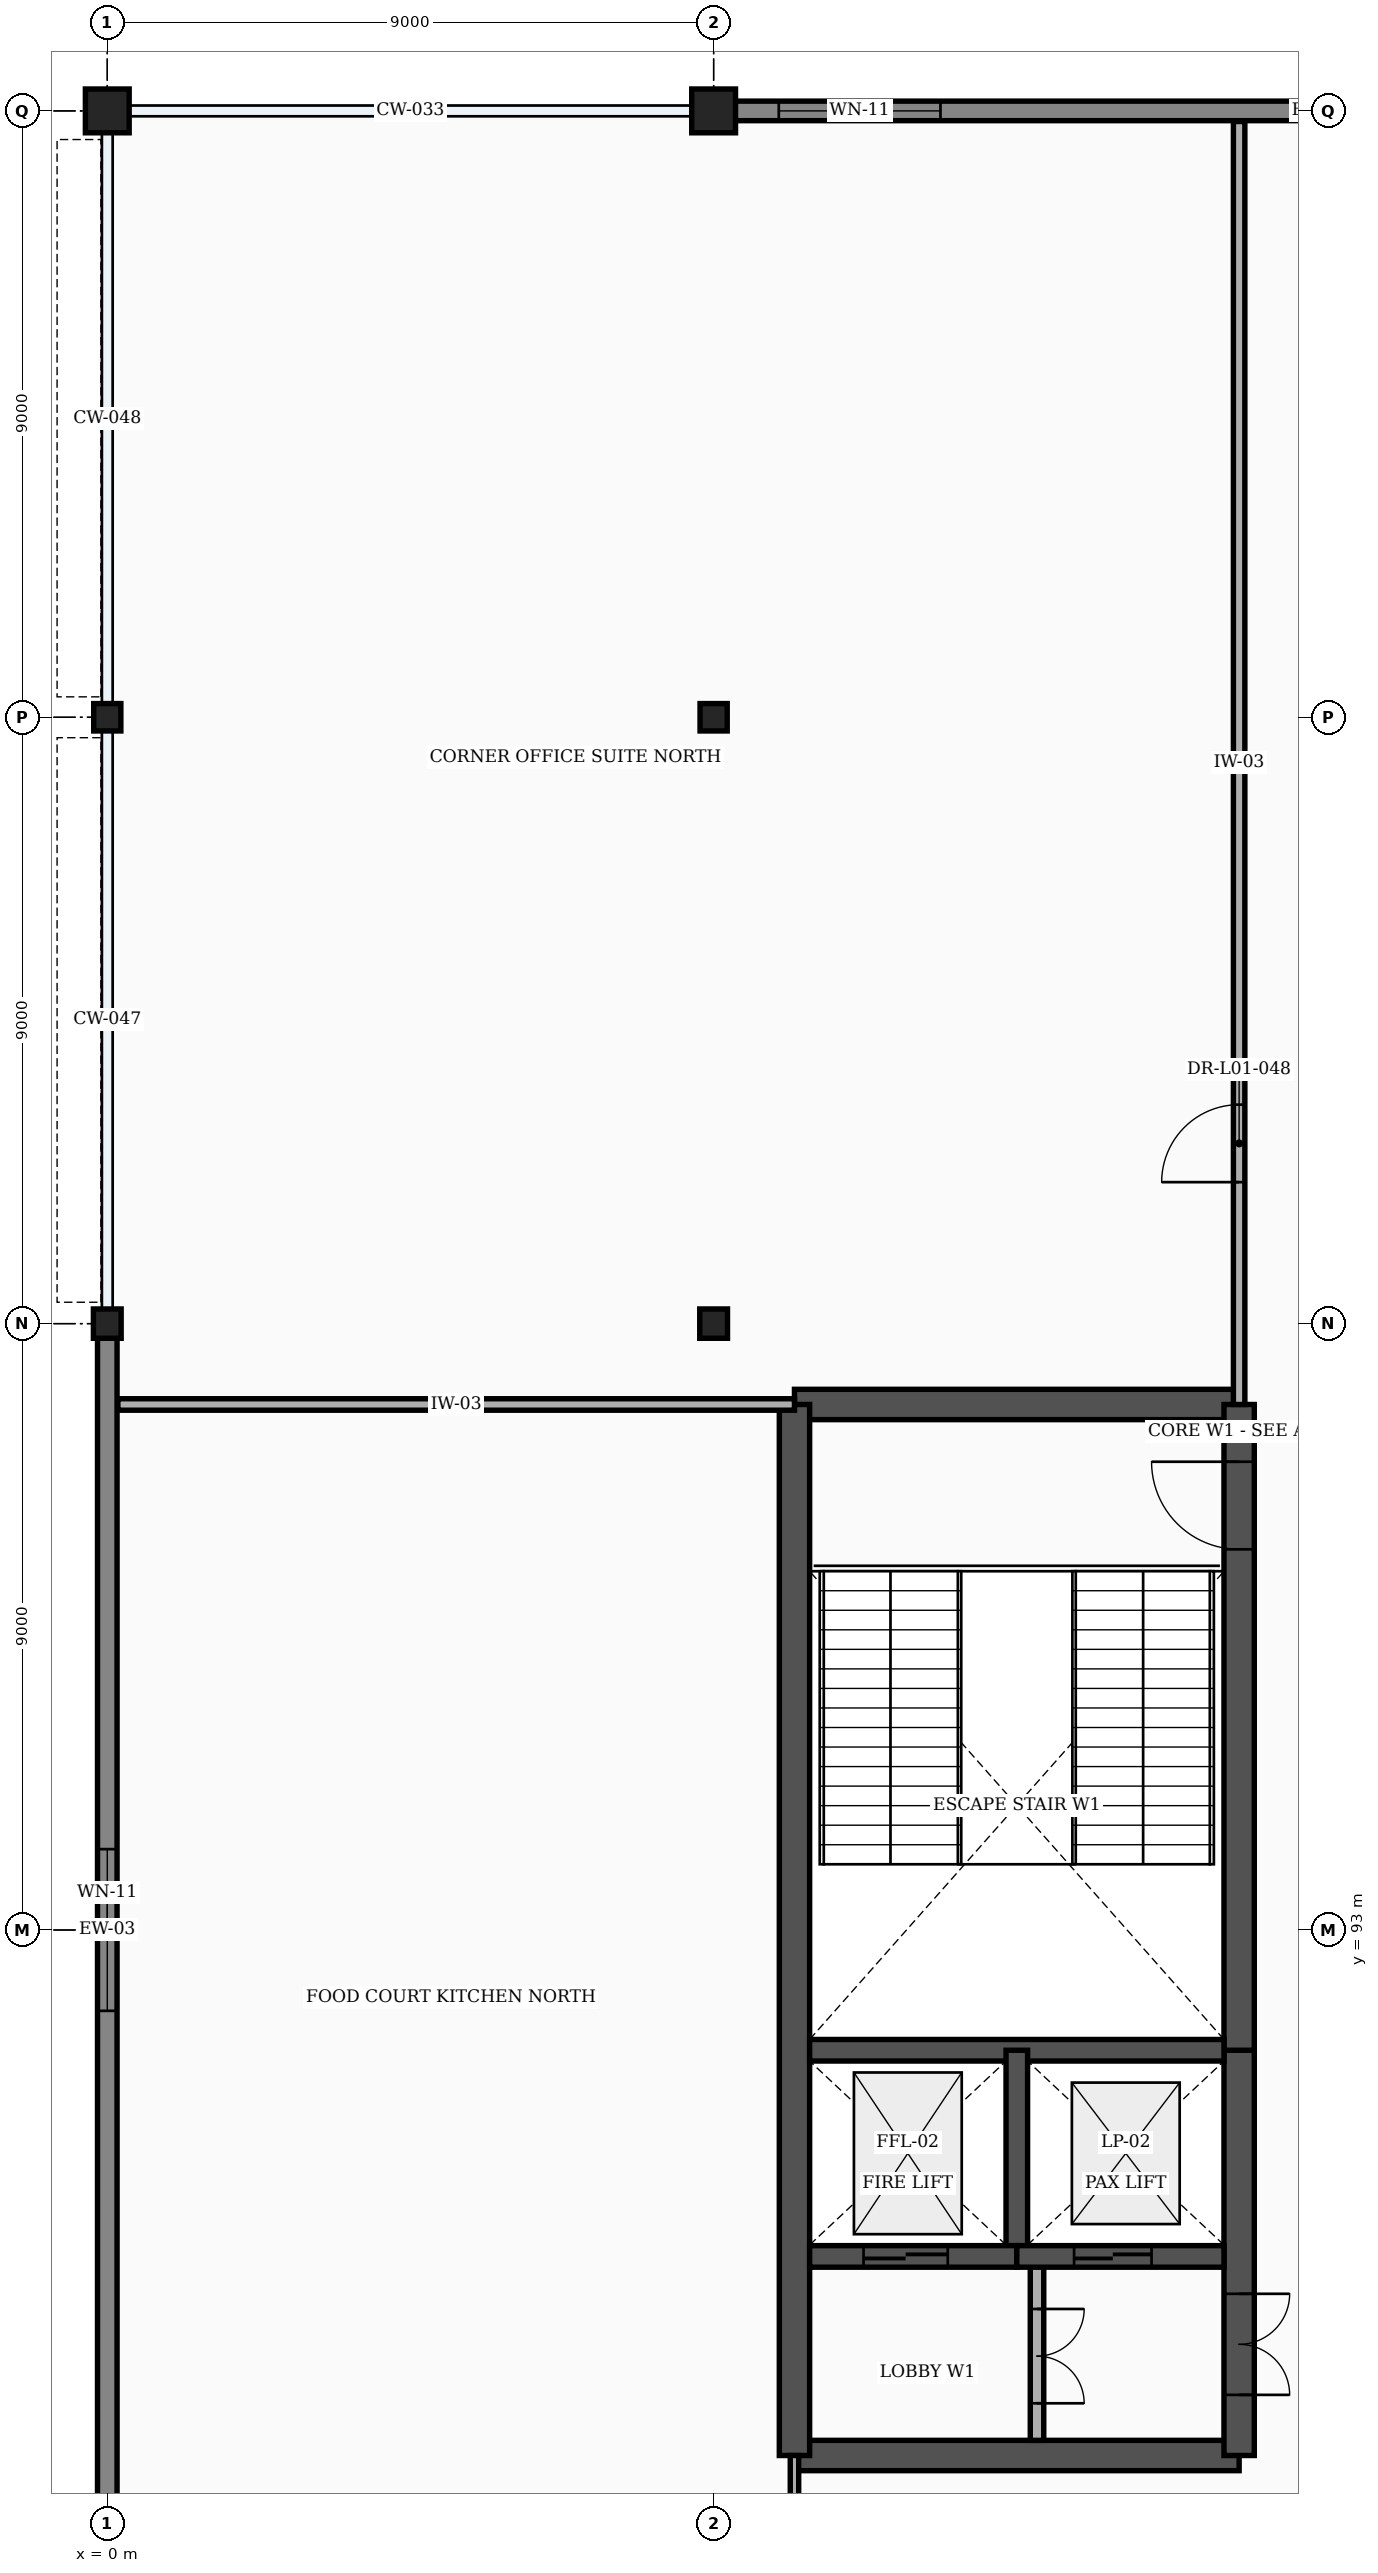
"""IFC4 building model, lengths in metres.
Left out: names, types, materials, properties, quantities, classifications, styles, units other than length and angle.
Written with IfcOpenShell. Run it as: python <this file> out.ifc"""

import sys

from ifc_helpers import new_model, si_unit, direction, frame, frame_2d, origin, origin_2d, place, context, subcontext, project, spatial, rectangle, i_section, extrude, element, fill, save


model = new_model("IFC4")
c1 = context("Model", 3, precision=1e-05, world=origin(), true_north=direction((0.0, 1.0)))
c2 = subcontext(c1, "Body", "Model", "MODEL_VIEW")
j1 = project(units=[si_unit("LENGTHUNIT", "METRE"), si_unit("PLANEANGLEUNIT", "RADIAN")], contexts=[c1])
p1 = place(None, origin())
s1 = spatial("IfcSite", under=j1, at=p1, CompositionType="ELEMENT")
p2 = place(p1, origin())
s2 = spatial("IfcBuilding", under=s1, at=p2, CompositionType="ELEMENT")
p3 = place(p2, frame((0.0, 0.0, 6.0)))
s3 = spatial("IfcBuildingStorey", under=s2, at=p3, CompositionType="ELEMENT", Elevation=6.0)
p4 = place(p3, frame((0.0, 102.0, 0.0), z_axis=(0.0, 0.0, 1.0), x_axis=(1.0, 0.0, 0.0)))
e1 = element("IfcColumn", 1, at=p4, inside=s3, PredefinedType="COLUMN", context=c2, shape_type="SweptSolid", body=[
    extrude(i_section(OverallWidth=0.412, OverallDepth=0.435, WebThickness=0.036, FlangeThickness=0.058, at=origin_2d()), origin(), (0.0, 0.0, 1.0), 5.4),
])
p5 = place(p3, frame((0.0, 111.0, 0.0), z_axis=(0.0, 0.0, 1.0), x_axis=(1.0, 0.0, 0.0)))
e2 = element("IfcColumn", 2, at=p5, inside=s3, PredefinedType="COLUMN", context=c2, shape_type="SweptSolid", body=[
    extrude(i_section(OverallWidth=0.403, OverallDepth=0.406, WebThickness=0.027, FlangeThickness=0.043, at=origin_2d()), origin(), (0.0, 0.0, 1.0), 5.4),
])
p6 = place(p3, frame((0.0, 120.0, 0.0), z_axis=(0.0, 0.0, 1.0), x_axis=(1.0, 0.0, 0.0)))
e3 = element("IfcColumn", 3, at=p6, inside=s3, PredefinedType="COLUMN", context=c2, shape_type="SweptSolid", body=[
    extrude(rectangle(XDim=0.65, YDim=0.65, at=origin_2d()), origin(), (0.0, 0.0, 1.0), 5.4),
])
p7 = place(p3, frame((9.0, 102.0, 0.0), z_axis=(0.0, 0.0, 1.0), x_axis=(1.0, 0.0, 0.0)))
e4 = element("IfcColumn", 4, at=p7, inside=s3, PredefinedType="COLUMN", context=c2, shape_type="SweptSolid", body=[
    extrude(i_section(OverallWidth=0.412, OverallDepth=0.435, WebThickness=0.036, FlangeThickness=0.058, at=origin_2d()), origin(), (0.0, 0.0, 1.0), 5.4),
])
p8 = place(p3, frame((9.0, 111.0, 0.0), z_axis=(0.0, 0.0, 1.0), x_axis=(1.0, 0.0, 0.0)))
e5 = element("IfcColumn", 5, at=p8, inside=s3, PredefinedType="COLUMN", context=c2, shape_type="SweptSolid", body=[
    extrude(i_section(OverallWidth=0.403, OverallDepth=0.406, WebThickness=0.027, FlangeThickness=0.043, at=origin_2d()), origin(), (0.0, 0.0, 1.0), 5.4),
])
p9 = place(p3, frame((9.0, 120.0, 0.0), z_axis=(0.0, 0.0, 1.0), x_axis=(1.0, 0.0, 0.0)))
e6 = element("IfcColumn", 6, at=p9, inside=s3, PredefinedType="COLUMN", context=c2, shape_type="SweptSolid", body=[
    extrude(rectangle(XDim=0.65, YDim=0.65, at=origin_2d()), origin(), (0.0, 0.0, 1.0), 5.4),
])
p10 = place(p3, frame((9.317, 120.0, 0.0), z_axis=(0.0, 0.0, 1.0), x_axis=(1.0, 0.0, 0.0)))
e7 = element("IfcWall", 7, at=p10, inside=s3, PredefinedType="STANDARD", context=c2, shape_type="SweptSolid", body=[
    extrude(rectangle(XDim=17.366, YDim=0.29, at=frame_2d((8.683, 0.0))), origin(), (0.0, 0.0, 1.0), 4.388),
])
p11 = place(p10, frame((0.65, 0.0, 0.85)))
e8 = element("IfcOpeningElement", 8, at=p11, cuts=e7, PredefinedType="OPENING", context=c2, shape_type="SweptSolid", body=[
    extrude(rectangle(XDim=2.4, YDim=2.6, at=frame_2d((1.2, 1.3))), frame((0.0, 0.157, 0.0), z_axis=(0.0, -1.0, 0.0), x_axis=(1.0, 0.0, 0.0)), (0.0, 0.0, 1.0), 0.314),
])
p12 = place(p3, frame((0.0, 84.198, 0.0), z_axis=(0.0, 0.0, 1.0), x_axis=(0.0, 1.0, 0.0)))
e9 = element("IfcWall", 9, at=p12, inside=s3, PredefinedType="STANDARD", context=c2, shape_type="SweptSolid", body=[
    extrude(rectangle(XDim=17.603, YDim=0.29, at=frame_2d((8.802, 0.0))), origin(), (0.0, 0.0, 1.0), 4.467),
])
p13 = place(p12, frame((7.602, 0.0, 0.85)))
e10 = element("IfcOpeningElement", 10, at=p13, cuts=e9, PredefinedType="OPENING", context=c2, shape_type="SweptSolid", body=[
    extrude(rectangle(XDim=2.4, YDim=2.6, at=frame_2d((1.2, 1.3))), frame((0.0, 0.157, 0.0), z_axis=(0.0, -1.0, 0.0), x_axis=(1.0, 0.0, 0.0)), (0.0, 0.0, 1.0), 0.314),
])
for number, where, z_axis, x_axis in (
    (11, (10.2, 85.2, 0.0), (0.0, 0.0, 1.0), (1.0, 0.0, 0.0)),
    (12, (10.2, 100.8, 0.0), (0.0, 0.0, 1.0), (1.0, 0.0, 0.0)),
):
    element("IfcWall", number, at=place(p3, frame(where, z_axis=z_axis, x_axis=x_axis)), inside=s3, PredefinedType="SHEAR", context=c2, shape_type="SweptSolid", body=[
        extrude(rectangle(XDim=6.6, YDim=0.45, at=frame_2d((3.3, 0.0))), origin(), (0.0, 0.0, 1.0), 5.15),
    ])
p14 = place(p3, frame((10.2, 85.2, 0.0), z_axis=(0.0, 0.0, 1.0), x_axis=(0.0, 1.0, 0.0)))
e13 = element("IfcWall", 13, at=p14, inside=s3, PredefinedType="SHEAR", context=c2, shape_type="SweptSolid", body=[
    extrude(rectangle(XDim=15.6, YDim=0.45, at=frame_2d((7.8, 0.0))), origin(), (0.0, 0.0, 1.0), 5.15),
])
p15 = place(p3, frame((16.8, 85.2, 0.0), z_axis=(0.0, 0.0, 1.0), x_axis=(0.0, 1.0, 0.0)))
e14 = element("IfcWall", 14, at=p15, inside=s3, PredefinedType="SHEAR", context=c2, shape_type="SweptSolid", body=[
    extrude(rectangle(XDim=6.015, YDim=0.45, at=frame_2d((3.008, 0.0))), origin(), (0.0, 0.0, 1.0), 5.15),
])
p16 = place(p15, frame((0.9, 0.0, 0.0)))
e15 = element("IfcOpeningElement", 15, at=p16, cuts=e14, PredefinedType="OPENING", context=c2, shape_type="SweptSolid", body=[
    extrude(rectangle(XDim=1.5, YDim=2.2, at=frame_2d((0.75, 1.1))), frame((0.0, 0.237, 0.0), z_axis=(0.0, -1.0, 0.0), x_axis=(1.0, 0.0, 0.0)), (0.0, 0.0, 1.0), 0.474),
])
p17 = place(p3, frame((16.8, 91.215, 0.0), z_axis=(0.0, 0.0, 1.0), x_axis=(0.0, 1.0, 0.0)))
e16 = element("IfcWall", 16, at=p17, inside=s3, PredefinedType="SHEAR", context=c2, shape_type="SweptSolid", body=[
    extrude(rectangle(XDim=9.585, YDim=0.45, at=frame_2d((4.792, 0.0))), origin(), (0.0, 0.0, 1.0), 5.15),
])
p18 = place(p17, frame((7.435, 0.0, 0.0)))
e17 = element("IfcOpeningElement", 17, at=p18, cuts=e16, PredefinedType="OPENING", context=c2, shape_type="SweptSolid", body=[
    extrude(rectangle(XDim=1.3, YDim=2.2, at=frame_2d((0.65, 1.1))), frame((0.0, 0.237, 0.0), z_axis=(0.0, -1.0, 0.0), x_axis=(1.0, 0.0, 0.0)), (0.0, 0.0, 1.0), 0.474),
])
p19 = place(p3, frame((10.425, 91.215, 0.0), z_axis=(0.0, 0.0, 1.0), x_axis=(1.0, 0.0, 0.0)))
e18 = element("IfcWall", 18, at=p19, inside=s3, PredefinedType="SHEAR", context=c2, shape_type="SweptSolid", body=[
    extrude(rectangle(XDim=6.15, YDim=0.32, at=frame_2d((3.075, 0.0))), origin(), (0.0, 0.0, 1.0), 5.15),
])
p20 = place(p3, frame((13.5, 88.155, 0.0), z_axis=(0.0, 0.0, 1.0), x_axis=(0.0, 1.0, 0.0)))
e19 = element("IfcWall", 19, at=p20, inside=s3, PredefinedType="SHEAR", context=c2, shape_type="SweptSolid", body=[
    extrude(rectangle(XDim=3.06, YDim=0.32, at=frame_2d((1.53, 0.0))), origin(), (0.0, 0.0, 1.0), 5.15),
])
p21 = place(p3, frame((13.8, 85.425, 0.0), z_axis=(0.0, 0.0, 1.0), x_axis=(0.0, 1.0, 0.0)))
e20 = element("IfcWall", 20, at=p21, inside=s3, PredefinedType="PARTITIONING", context=c2, shape_type="SweptSolid", body=[
    extrude(rectangle(XDim=2.73, YDim=0.2, at=frame_2d((1.365, 0.0))), origin(), (0.0, 0.0, 1.0), 5.15),
])
p22 = place(p21, frame((0.55, 0.0, 0.0)))
e21 = element("IfcOpeningElement", 21, at=p22, cuts=e20, PredefinedType="OPENING", context=c2, shape_type="SweptSolid", body=[
    extrude(rectangle(XDim=1.4, YDim=2.25, at=frame_2d((0.7, 1.125))), frame((0.0, 0.112, 0.0), z_axis=(0.0, -1.0, 0.0), x_axis=(1.0, 0.0, 0.0)), (0.0, 0.0, 1.0), 0.224),
])
p23 = place(p3, frame((10.425, 88.155, 0.0), z_axis=(0.0, 0.0, 1.0), x_axis=(1.0, 0.0, 0.0)))
e22 = element("IfcWall", 22, at=p23, inside=s3, PredefinedType="SHEAR", context=c2, shape_type="SweptSolid", body=[
    extrude(rectangle(XDim=3.075, YDim=0.32, at=frame_2d((1.538, 0.0))), origin(), (0.0, 0.0, 1.0), 5.15),
])
p24 = place(p23, frame((0.8, 0.0, 0.0)))
e23 = element("IfcOpeningElement", 23, at=p24, cuts=e22, PredefinedType="OPENING", context=c2, shape_type="SweptSolid", body=[
    extrude(rectangle(XDim=1.25, YDim=2.25, at=frame_2d((0.625, 1.125))), frame((0.0, 0.172, 0.0), z_axis=(0.0, -1.0, 0.0), x_axis=(1.0, 0.0, 0.0)), (0.0, 0.0, 1.0), 0.344),
])
p25 = place(p3, frame((13.5, 88.155, 0.0), z_axis=(0.0, 0.0, 1.0), x_axis=(1.0, 0.0, 0.0)))
e24 = element("IfcWall", 24, at=p25, inside=s3, PredefinedType="SHEAR", context=c2, shape_type="SweptSolid", body=[
    extrude(rectangle(XDim=3.075, YDim=0.32, at=frame_2d((1.538, 0.0))), origin(), (0.0, 0.0, 1.0), 5.15),
])
p26 = place(p25, frame((0.85, 0.0, 0.0)))
e25 = element("IfcOpeningElement", 25, at=p26, cuts=e24, PredefinedType="OPENING", context=c2, shape_type="SweptSolid", body=[
    extrude(rectangle(XDim=1.15, YDim=2.2, at=frame_2d((0.575, 1.1))), frame((0.0, 0.172, 0.0), z_axis=(0.0, -1.0, 0.0), x_axis=(1.0, 0.0, 0.0)), (0.0, 0.0, 1.0), 0.344),
])
p27 = place(p3, frame((10.2, 83.2, 0.0), z_axis=(0.0, 0.0, 1.0), x_axis=(0.0, 1.0, 0.0)))
e26 = element("IfcWall", 26, at=p27, inside=s3, PredefinedType="PARTITIONING", context=c2, shape_type="SweptSolid", body=[
    extrude(rectangle(XDim=2.0, YDim=0.125, at=frame_2d((1.0, 0.0))), origin(), (0.0, 0.0, 1.0), 5.15),
])
p28 = place(p3, frame((0.157, 100.8, 0.0), z_axis=(0.0, 0.0, 1.0), x_axis=(1.0, 0.0, 0.0)))
e27 = element("IfcWall", 27, at=p28, inside=s3, PredefinedType="PARTITIONING", context=c2, shape_type="SweptSolid", body=[
    extrude(rectangle(XDim=10.042, YDim=0.17, at=frame_2d((5.021, 0.0))), origin(), (0.0, 0.0, 1.0), 5.15),
])
p29 = place(p3, frame((16.8, 100.8, 0.0), z_axis=(0.0, 0.0, 1.0), x_axis=(0.0, 1.0, 0.0)))
e28 = element("IfcWall", 28, at=p29, inside=s3, PredefinedType="PARTITIONING", context=c2, shape_type="SweptSolid", body=[
    extrude(rectangle(XDim=19.042, YDim=0.17, at=frame_2d((9.521, 0.0))), origin(), (0.0, 0.0, 1.0), 5.15),
])
p30 = place(p29, frame((3.3, 0.0, 0.0)))
e29 = element("IfcOpeningElement", 29, at=p30, cuts=e28, PredefinedType="OPENING", context=c2, shape_type="SweptSolid", body=[
    extrude(rectangle(XDim=1.15, YDim=2.15, at=frame_2d((0.575, 1.075))), frame((0.0, 0.097, 0.0), z_axis=(0.0, -1.0, 0.0), x_axis=(1.0, 0.0, 0.0)), (0.0, 0.0, 1.0), 0.194),
])
p31 = place(p11, origin())
e30 = element("IfcWindow", 30, at=p31, inside=s3, PartitioningType="SINGLE_PANEL", PredefinedType="WINDOW", context=c2, shape_type="SweptSolid", body=[
    extrude(rectangle(XDim=2.4, YDim=2.6, at=frame_2d((1.2, 1.3))), frame((0.0, 0.03, 0.0), z_axis=(0.0, -1.0, 0.0), x_axis=(1.0, 0.0, 0.0)), (0.0, 0.0, 1.0), 0.06),
])
fill(e8, e30)
p32 = place(p13, origin())
e31 = element("IfcWindow", 31, at=p32, inside=s3, PartitioningType="SINGLE_PANEL", PredefinedType="WINDOW", context=c2, shape_type="SweptSolid", body=[
    extrude(rectangle(XDim=2.4, YDim=2.6, at=frame_2d((1.2, 1.3))), frame((0.0, 0.03, 0.0), z_axis=(0.0, -1.0, 0.0), x_axis=(1.0, 0.0, 0.0)), (0.0, 0.0, 1.0), 0.06),
])
fill(e10, e31)
p33 = place(p16, frame((1.5, 0.0, 0.0), z_axis=(0.0, 0.0, 1.0), x_axis=(-1.0, 0.0, 0.0)))
e32 = element("IfcDoor", 32, at=p33, inside=s3, OperationType="DOUBLE_DOOR_SINGLE_SWING", PredefinedType="DOOR", context=c2, shape_type="SweptSolid", body=[
    extrude(rectangle(XDim=1.5, YDim=2.2, at=frame_2d((0.75, 1.1))), frame((0.0, 0.025, 0.0), z_axis=(0.0, -1.0, 0.0), x_axis=(1.0, 0.0, 0.0)), (0.0, 0.0, 1.0), 0.05),
])
fill(e15, e32)
p34 = place(p18, origin())
e33 = element("IfcDoor", 33, at=p34, inside=s3, OperationType="SINGLE_SWING_RIGHT", PredefinedType="DOOR", context=c2, shape_type="SweptSolid", body=[
    extrude(rectangle(XDim=1.3, YDim=2.2, at=frame_2d((0.65, 1.1))), frame((0.0, 0.025, 0.0), z_axis=(0.0, -1.0, 0.0), x_axis=(1.0, 0.0, 0.0)), (0.0, 0.0, 1.0), 0.05),
])
fill(e17, e33)
p35 = place(p22, frame((1.4, 0.0, 0.0), z_axis=(0.0, 0.0, 1.0), x_axis=(-1.0, 0.0, 0.0)))
e34 = element("IfcDoor", 34, at=p35, inside=s3, OperationType="DOUBLE_DOOR_SINGLE_SWING", PredefinedType="DOOR", context=c2, shape_type="SweptSolid", body=[
    extrude(rectangle(XDim=1.4, YDim=2.25, at=frame_2d((0.7, 1.125))), frame((0.0, 0.025, 0.0), z_axis=(0.0, -1.0, 0.0), x_axis=(1.0, 0.0, 0.0)), (0.0, 0.0, 1.0), 0.05),
])
fill(e21, e34)
p36 = place(p24, origin())
e35 = element("IfcDoor", 35, at=p36, inside=s3, OperationType="DOUBLE_DOOR_SLIDING", PredefinedType="DOOR", context=c2, shape_type="SweptSolid", body=[
    extrude(rectangle(XDim=1.25, YDim=2.25, at=frame_2d((0.625, 1.125))), frame((0.0, 0.025, 0.0), z_axis=(0.0, -1.0, 0.0), x_axis=(1.0, 0.0, 0.0)), (0.0, 0.0, 1.0), 0.05),
])
fill(e23, e35)
p37 = place(p26, origin())
e36 = element("IfcDoor", 36, at=p37, inside=s3, OperationType="DOUBLE_DOOR_SLIDING", PredefinedType="DOOR", context=c2, shape_type="SweptSolid", body=[
    extrude(rectangle(XDim=1.15, YDim=2.2, at=frame_2d((0.575, 1.1))), frame((0.0, 0.025, 0.0), z_axis=(0.0, -1.0, 0.0), x_axis=(1.0, 0.0, 0.0)), (0.0, 0.0, 1.0), 0.05),
])
fill(e25, e36)
p38 = place(p30, origin())
e37 = element("IfcDoor", 37, at=p38, inside=s3, OperationType="SINGLE_SWING_LEFT", PredefinedType="DOOR", context=c2, shape_type="SweptSolid", body=[
    extrude(rectangle(XDim=1.15, YDim=2.15, at=frame_2d((0.575, 1.075))), frame((0.0, 0.025, 0.0), z_axis=(0.0, -1.0, 0.0), x_axis=(1.0, 0.0, 0.0)), (0.0, 0.0, 1.0), 0.05),
])
fill(e29, e37)
save(model, sys.argv[1])
